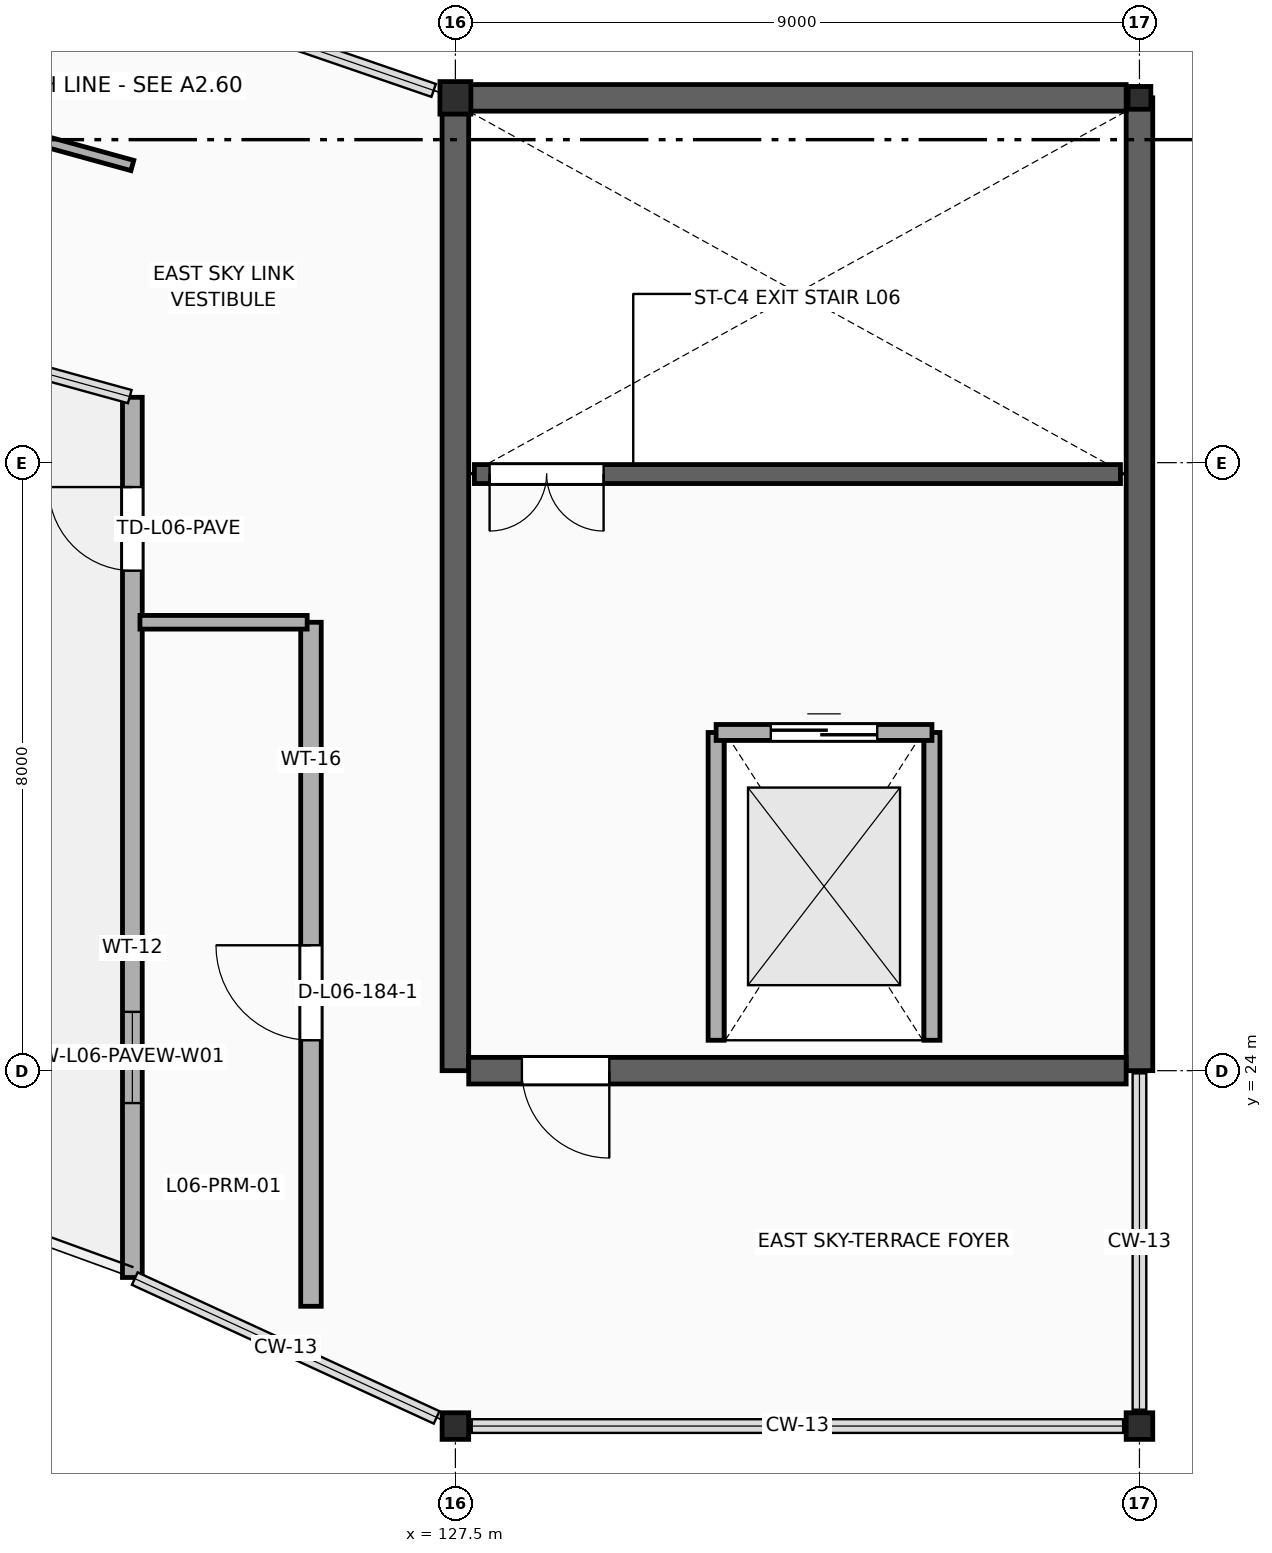
"""IFC4 building model, lengths in metres.
Left out: names, types, materials, properties, quantities, classifications, styles, units other than length and angle.
Written with IfcOpenShell. Run it as: python <this file> out.ifc"""

import sys

from ifc_helpers import new_model, si_unit, direction, frame, frame_2d, origin, origin_2d, place, context, subcontext, project, spatial, rectangle, i_section, extrude, element, fill, save


model = new_model("IFC4")
c1 = context("Model", 3, precision=1e-05, world=origin(), true_north=direction((0.0, 1.0)))
c2 = subcontext(c1, "Body", "Model", "MODEL_VIEW")
j1 = project(units=[si_unit("LENGTHUNIT", "METRE"), si_unit("PLANEANGLEUNIT", "RADIAN")], contexts=[c1])
p1 = place(None, origin())
s1 = spatial("IfcSite", under=j1, at=p1, CompositionType="ELEMENT")
p2 = place(p1, origin())
s2 = spatial("IfcBuilding", under=s1, at=p2, CompositionType="ELEMENT")
p3 = place(p2, frame((0.0, 0.0, 29.4)))
s3 = spatial("IfcBuildingStorey", under=s2, at=p3, CompositionType="ELEMENT", Elevation=29.4)
for number, where, z_axis, x_axis in (
    (1, (127.5, 24.0, 0.0), (0.0, 0.0, 1.0), (0.0, 1.0, 0.0)),
    (2, (136.5, 24.0, 0.0), (0.0, 0.0, 1.0), (0.0, 1.0, 0.0)),
):
    element("IfcWall", number, at=place(p3, frame(where, z_axis=z_axis, x_axis=x_axis)), inside=s3, PredefinedType="SHEAR", context=c2, shape_type="SweptSolid", body=[
        extrude(rectangle(XDim=12.8, YDim=0.35, at=frame_2d((6.4, 0.0))), origin(), (0.0, 0.0, 1.0), 4.49),
    ])
p4 = place(p3, frame((127.675, 36.8, 0.0), z_axis=(0.0, 0.0, 1.0), x_axis=(1.0, 0.0, 0.0)))
e3 = element("IfcWall", 3, at=p4, inside=s3, PredefinedType="SHEAR", context=c2, shape_type="SweptSolid", body=[
    extrude(rectangle(XDim=8.65, YDim=0.35, at=frame_2d((4.325, 0.0))), origin(), (0.0, 0.0, 1.0), 4.49),
])
p5 = place(p3, frame((127.675, 24.0, 0.0), z_axis=(0.0, 0.0, 1.0), x_axis=(1.0, 0.0, 0.0)))
e4 = element("IfcWall", 4, at=p5, inside=s3, PredefinedType="SHEAR", context=c2, shape_type="SweptSolid", body=[
    extrude(rectangle(XDim=8.65, YDim=0.35, at=frame_2d((4.325, 0.0))), origin(), (0.0, 0.0, 1.0), 4.49),
])
p6 = place(p5, frame((0.7, 0.0, 0.0)))
e5 = element("IfcOpeningElement", 5, at=p6, cuts=e4, PredefinedType="OPENING", context=c2, shape_type="SweptSolid", body=[
    extrude(rectangle(XDim=1.15, YDim=2.2, at=frame_2d((0.575, 1.1))), frame((0.0, 0.187, 0.0), z_axis=(0.0, -1.0, 0.0), x_axis=(1.0, 0.0, 0.0)), (0.0, 0.0, 1.0), 0.374),
])
p7 = place(p3, frame((127.75, 31.85, 0.0), z_axis=(0.0, 0.0, 1.0), x_axis=(1.0, 0.0, 0.0)))
e6 = element("IfcWall", 6, at=p7, inside=s3, PredefinedType="STANDARD", context=c2, shape_type="SweptSolid", body=[
    extrude(rectangle(XDim=8.5, YDim=0.25, at=frame_2d((4.25, 0.0))), origin(), (0.0, 0.0, 1.0), 4.49),
])
p8 = place(p7, frame((0.2, 0.0, 0.0)))
e7 = element("IfcOpeningElement", 7, at=p8, cuts=e6, PredefinedType="OPENING", context=c2, shape_type="SweptSolid", body=[
    extrude(rectangle(XDim=1.5, YDim=2.2, at=frame_2d((0.75, 1.1))), frame((0.0, 0.137, 0.0), z_axis=(0.0, -1.0, 0.0), x_axis=(1.0, 0.0, 0.0)), (0.0, 0.0, 1.0), 0.274),
])
for number, where, z_axis, x_axis in (
    (8, (130.93, 24.4, 0.0), (0.0, 0.0, 1.0), (0.0, 1.0, 0.0)),
    (9, (133.77, 24.4, 0.0), (0.0, 0.0, 1.0), (0.0, 1.0, 0.0)),
):
    element("IfcWall", number, at=place(p3, frame(where, z_axis=z_axis, x_axis=x_axis)), inside=s3, PredefinedType="PARTITIONING", context=c2, shape_type="SweptSolid", body=[
        extrude(rectangle(XDim=4.05, YDim=0.21, at=frame_2d((2.025, 0.0))), origin(), (0.0, 0.0, 1.0), 4.49),
    ])
p9 = place(p3, frame((130.93, 28.45, 0.0), z_axis=(0.0, 0.0, 1.0), x_axis=(1.0, 0.0, 0.0)))
e10 = element("IfcWall", 10, at=p9, inside=s3, PredefinedType="PARTITIONING", context=c2, shape_type="SweptSolid", body=[
    extrude(rectangle(XDim=2.84, YDim=0.21, at=frame_2d((1.42, 0.0))), origin(), (0.0, 0.0, 1.0), 4.49),
])
p10 = place(p9, frame((0.72, 0.0, 0.0)))
e11 = element("IfcOpeningElement", 11, at=p10, cuts=e10, PredefinedType="OPENING", context=c2, shape_type="SweptSolid", body=[
    extrude(rectangle(XDim=1.4, YDim=2.35, at=frame_2d((0.7, 1.175))), frame((0.0, 0.117, 0.0), z_axis=(0.0, -1.0, 0.0), x_axis=(1.0, 0.0, 0.0)), (0.0, 0.0, 1.0), 0.234),
])
p11 = place(p3, frame((127.5, 36.8, 0.0), z_axis=(0.0, 0.0, 1.0), x_axis=(1.0, 0.0, 0.0)))
e12 = element("IfcColumn", 12, at=p11, inside=s3, PredefinedType="COLUMN", context=c2, shape_type="SweptSolid", body=[
    extrude(i_section(OverallWidth=0.407, OverallDepth=0.428, WebThickness=0.02, FlangeThickness=0.035, at=origin_2d()), origin(), (0.0, 0.0, 1.0), 4.49),
])
p12 = place(p3, frame((136.5, 36.8, 0.0), z_axis=(0.0, 0.0, 1.0), x_axis=(1.0, 0.0, 0.0)))
e13 = element("IfcColumn", 13, at=p12, inside=s3, PredefinedType="COLUMN", context=c2, shape_type="SweptSolid", body=[
    extrude(i_section(OverallWidth=0.3, OverallDepth=0.3, WebThickness=0.01, FlangeThickness=0.015, at=origin_2d()), origin(), (0.0, 0.0, 1.0), 4.49),
])
for number, where, z_axis, x_axis in (
    (14, (136.5, 19.324, 0.0), (0.0, 0.0, 1.0), (1.0, 0.0, 0.0)),
    (15, (127.5, 19.324, 0.0), (0.0, 0.0, 1.0), (1.0, 0.0, 0.0)),
):
    element("IfcColumn", number, at=place(p3, frame(where, z_axis=z_axis, x_axis=x_axis)), inside=s3, PredefinedType="COLUMN", context=c2, shape_type="SweptSolid", body=[
        extrude(i_section(OverallWidth=0.35, OverallDepth=0.35, WebThickness=0.012, FlangeThickness=0.019, at=origin_2d()), origin(), (0.0, 0.0, 1.0), 4.49),
    ])
p13 = place(p3, frame((123.25, 21.279, 0.0), z_axis=(0.0, 0.0, 1.0), x_axis=(0.0, 1.0, 0.0)))
e16 = element("IfcWall", 16, at=p13, inside=s3, PredefinedType="STANDARD", context=c2, shape_type="SweptSolid", body=[
    extrude(rectangle(XDim=11.581, YDim=0.26, at=frame_2d((5.791, 0.0))), origin(), (0.0, 0.0, 1.0), 4.45),
])
p14 = place(p13, frame((9.3, 0.0, 0.0)))
e17 = element("IfcOpeningElement", 17, at=p14, cuts=e16, PredefinedType="OPENING", context=c2, shape_type="SweptSolid", body=[
    extrude(rectangle(XDim=1.1, YDim=2.2, at=frame_2d((0.55, 1.1))), frame((0.0, 0.142, 0.0), z_axis=(0.0, -1.0, 0.0), x_axis=(1.0, 0.0, 0.0)), (0.0, 0.0, 1.0), 0.284),
])
p15 = place(p13, frame((2.295, 0.0, 1.1)))
e18 = element("IfcOpeningElement", 18, at=p15, cuts=e16, PredefinedType="OPENING", context=c2, shape_type="SweptSolid", body=[
    extrude(rectangle(XDim=1.2, YDim=2.2, at=frame_2d((0.6, 1.1))), frame((0.0, 0.142, 0.0), z_axis=(0.0, -1.0, 0.0), x_axis=(1.0, 0.0, 0.0)), (0.0, 0.0, 1.0), 0.284),
])
p16 = place(p3, frame((119.0, 37.081, 0.0), z_axis=(0.0, 0.0, 1.0), x_axis=(0.964066503431, -0.265661018897, 0.0)))
e19 = element("IfcWall", 19, at=p16, inside=s3, PredefinedType="PARTITIONING", context=c2, shape_type="SweptSolid", body=[
    extrude(rectangle(XDim=4.408, YDim=0.14, at=frame_2d((2.204, 0.0))), origin(), (0.0, 0.0, 1.0), 4.082),
])
p17 = place(p3, frame((125.6, 20.9, 0.0), z_axis=(0.0, 0.0, 1.0), x_axis=(0.0, 1.0, 0.0)))
e20 = element("IfcWall", 20, at=p17, inside=s3, PredefinedType="PARTITIONING", context=c2, shape_type="SweptSolid", body=[
    extrude(rectangle(XDim=9.0, YDim=0.27, at=frame_2d((4.5, 0.0))), origin(), (0.0, 0.0, 1.0), 4.5),
])
p18 = place(p17, frame((3.5, 0.0, 0.0)))
e21 = element("IfcOpeningElement", 21, at=p18, cuts=e20, PredefinedType="OPENING", context=c2, shape_type="SweptSolid", body=[
    extrude(rectangle(XDim=1.25, YDim=2.25, at=frame_2d((0.625, 1.125))), frame((0.0, 0.147, 0.0), z_axis=(0.0, -1.0, 0.0), x_axis=(1.0, 0.0, 0.0)), (0.0, 0.0, 1.0), 0.294),
])
p19 = place(p3, frame((123.35, 29.9, 0.0), z_axis=(0.0, 0.0, 1.0), x_axis=(1.0, 0.0, 0.0)))
e22 = element("IfcWall", 22, at=p19, inside=s3, PredefinedType="PARTITIONING", context=c2, shape_type="SweptSolid", body=[
    extrude(rectangle(XDim=2.2, YDim=0.18, at=frame_2d((1.1, 0.0))), origin(), (0.0, 0.0, 1.0), 4.5),
])
p20 = place(p8, frame((1.5, 0.0, 0.0), z_axis=(0.0, 0.0, 1.0), x_axis=(-1.0, 0.0, 0.0)))
e23 = element("IfcDoor", 23, at=p20, inside=s3, OperationType="DOUBLE_DOOR_SINGLE_SWING", PredefinedType="DOOR", context=c2, shape_type="SweptSolid", body=[
    extrude(rectangle(XDim=1.5, YDim=2.2, at=frame_2d((0.75, 1.1))), frame((0.0, 0.025, 0.0), z_axis=(0.0, -1.0, 0.0), x_axis=(1.0, 0.0, 0.0)), (0.0, 0.0, 1.0), 0.05),
])
fill(e7, e23)
p21 = place(p10, origin())
e24 = element("IfcDoor", 24, at=p21, inside=s3, OperationType="DOUBLE_DOOR_SLIDING", PredefinedType="DOOR", context=c2, shape_type="SweptSolid", body=[
    extrude(rectangle(XDim=1.4, YDim=2.35, at=frame_2d((0.7, 1.175))), frame((0.0, 0.025, 0.0), z_axis=(0.0, -1.0, 0.0), x_axis=(1.0, 0.0, 0.0)), (0.0, 0.0, 1.0), 0.05),
])
fill(e11, e24)
p22 = place(p6, frame((1.15, 0.0, 0.0), z_axis=(0.0, 0.0, 1.0), x_axis=(-1.0, 0.0, 0.0)))
e25 = element("IfcDoor", 25, at=p22, inside=s3, OperationType="SINGLE_SWING_RIGHT", PredefinedType="DOOR", context=c2, shape_type="SweptSolid", body=[
    extrude(rectangle(XDim=1.15, YDim=2.2, at=frame_2d((0.575, 1.1))), frame((0.0, 0.025, 0.0), z_axis=(0.0, -1.0, 0.0), x_axis=(1.0, 0.0, 0.0)), (0.0, 0.0, 1.0), 0.05),
])
fill(e5, e25)
p23 = place(p14, origin())
e26 = element("IfcDoor", 26, at=p23, inside=s3, OperationType="SINGLE_SWING_RIGHT", PredefinedType="DOOR", context=c2, shape_type="SweptSolid", body=[
    extrude(rectangle(XDim=1.1, YDim=2.2, at=frame_2d((0.55, 1.1))), frame((0.0, 0.025, 0.0), z_axis=(0.0, -1.0, 0.0), x_axis=(1.0, 0.0, 0.0)), (0.0, 0.0, 1.0), 0.05),
])
fill(e17, e26)
p24 = place(p15, origin())
e27 = element("IfcWindow", 27, at=p24, inside=s3, PartitioningType="SINGLE_PANEL", PredefinedType="WINDOW", context=c2, shape_type="SweptSolid", body=[
    extrude(rectangle(XDim=1.2, YDim=2.2, at=frame_2d((0.6, 1.1))), frame((0.0, 0.03, 0.0), z_axis=(0.0, -1.0, 0.0), x_axis=(1.0, 0.0, 0.0)), (0.0, 0.0, 1.0), 0.06),
])
fill(e18, e27)
p25 = place(p18, origin())
e28 = element("IfcDoor", 28, at=p25, inside=s3, OperationType="SINGLE_SWING_RIGHT", PredefinedType="DOOR", context=c2, shape_type="SweptSolid", body=[
    extrude(rectangle(XDim=1.25, YDim=2.25, at=frame_2d((0.625, 1.125))), frame((0.0, 0.025, 0.0), z_axis=(0.0, -1.0, 0.0), x_axis=(1.0, 0.0, 0.0)), (0.0, 0.0, 1.0), 0.05),
])
fill(e21, e28)
save(model, sys.argv[1])
